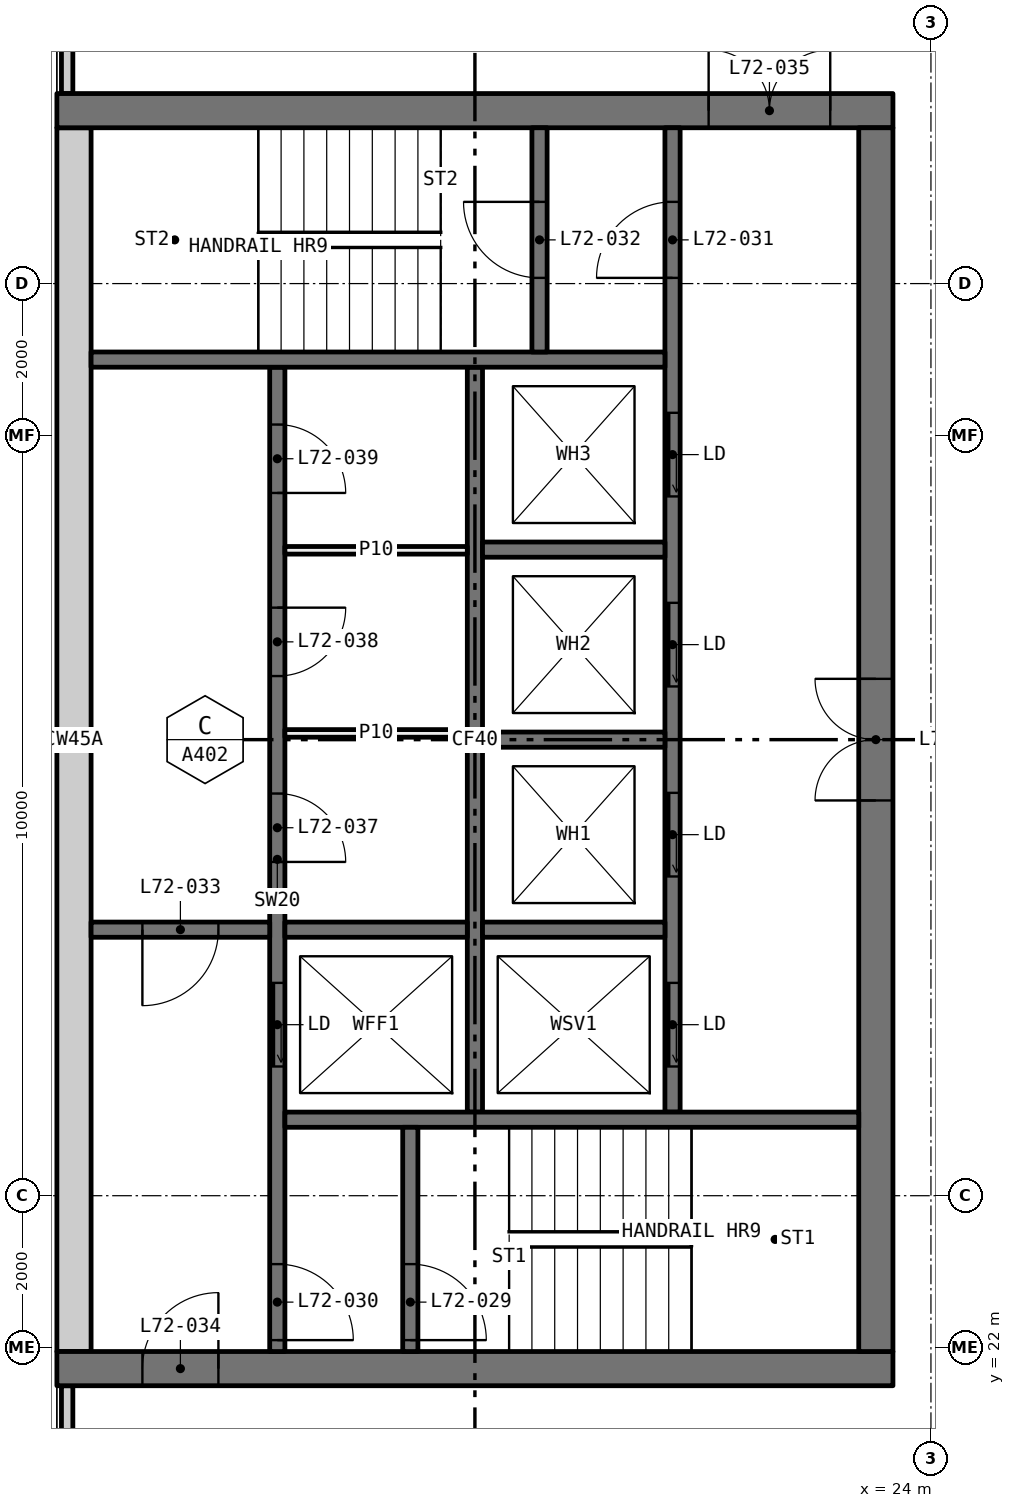
"""IFC4 building model, lengths in metres.
Left out: names, types, materials, properties, quantities, classifications, styles, units other than length and angle.
Written with IfcOpenShell. Run it as: python <this file> out.ifc"""

import sys

from ifc_helpers import new_model, si_unit, direction, frame, frame_2d, origin, place, context, subcontext, project, spatial, rectangle, extrude, element, fill, save


model = new_model("IFC4")
c1 = context("Model", 3, precision=1e-05, world=origin(), true_north=direction((0.0, 1.0)))
c2 = subcontext(c1, "Body", "Model", "MODEL_VIEW")
j1 = project(units=[si_unit("LENGTHUNIT", "METRE"), si_unit("PLANEANGLEUNIT", "RADIAN")], contexts=[c1])
p1 = place(None, origin())
s1 = spatial("IfcSite", under=j1, at=p1, CompositionType="ELEMENT")
p2 = place(p1, origin())
s2 = spatial("IfcBuilding", under=s1, at=p2, CompositionType="ELEMENT")
p3 = place(p2, frame((0.0, 0.0, 266.25)))
s3 = spatial("IfcBuildingStorey", under=s2, at=p3, CompositionType="ELEMENT", Elevation=266.25)
for number, where, z_axis, x_axis in (
    (1, (12.635, 18.71, 0.0), (0.0, 0.0, 1.0), (0.0, 1.0, 0.0)),
    (2, (12.635, 38.5, 0.0), (0.0, 0.0, 1.0), (0.0, 1.0, 0.0)),
):
    element("IfcWall", number, at=place(p3, frame(where, z_axis=z_axis, x_axis=x_axis)), inside=s3, PredefinedType="ELEMENTEDWALL", context=c2, shape_type="SweptSolid", body=[
        extrude(rectangle(XDim=2.79, YDim=0.15, at=frame_2d((1.395, 0.0))), origin(), (0.0, 0.0, 1.0), 3.05),
    ])
p4 = place(p3, frame((12.5, 21.725, 0.0), z_axis=(0.0, 0.0, 1.0), x_axis=(1.0, 0.0, 0.0)))
e3 = element("IfcWall", 3, at=p4, inside=s3, PredefinedType="SHEAR", context=c2, shape_type="SweptSolid", body=[
    extrude(rectangle(XDim=11.0, YDim=0.45, at=frame_2d((5.5, 0.0))), origin(), (0.0, 0.0, 1.0), 3.05),
])
p5 = place(p4, frame((1.125, 0.0, 0.0)))
e4 = element("IfcOpeningElement", 4, at=p5, cuts=e3, PredefinedType="OPENING", context=c2, shape_type="SweptSolid", body=[
    extrude(rectangle(XDim=1.0, YDim=2.1, at=frame_2d((0.5, 1.05))), frame((0.0, 0.235, 0.0), z_axis=(0.0, -1.0, 0.0), x_axis=(1.0, 0.0, 0.0)), (0.0, 0.0, 1.0), 0.47),
])
p6 = place(p3, frame((12.5, 38.275, 0.0), z_axis=(0.0, 0.0, 1.0), x_axis=(1.0, 0.0, 0.0)))
e5 = element("IfcWall", 5, at=p6, inside=s3, PredefinedType="SHEAR", context=c2, shape_type="SweptSolid", body=[
    extrude(rectangle(XDim=11.0, YDim=0.45, at=frame_2d((5.5, 0.0))), origin(), (0.0, 0.0, 1.0), 3.05),
])
p7 = place(p6, frame((8.575, 0.0, 0.0)))
e6 = element("IfcOpeningElement", 6, at=p7, cuts=e5, PredefinedType="OPENING", context=c2, shape_type="SweptSolid", body=[
    extrude(rectangle(XDim=1.6, YDim=2.1, at=frame_2d((0.8, 1.05))), frame((0.0, 0.235, 0.0), z_axis=(0.0, -1.0, 0.0), x_axis=(1.0, 0.0, 0.0)), (0.0, 0.0, 1.0), 0.47),
])
p8 = place(p3, frame((12.725, 21.95, 0.0), z_axis=(0.0, 0.0, 1.0), x_axis=(0.0, 1.0, 0.0)))
e7 = element("IfcWall", 7, at=p8, inside=s3, PredefinedType="SHEAR", context=c2, shape_type="SweptSolid", body=[
    extrude(rectangle(XDim=16.1, YDim=0.45, at=frame_2d((8.05, 0.0))), origin(), (0.0, 0.0, 1.0), 3.05),
])
p9 = place(p3, frame((23.275, 21.95, 0.0), z_axis=(0.0, 0.0, 1.0), x_axis=(0.0, 1.0, 0.0)))
e8 = element("IfcWall", 8, at=p9, inside=s3, PredefinedType="SHEAR", context=c2, shape_type="SweptSolid", body=[
    extrude(rectangle(XDim=16.1, YDim=0.45, at=frame_2d((8.05, 0.0))), origin(), (0.0, 0.0, 1.0), 3.05),
])
p10 = place(p9, frame((7.25, 0.0, 0.0)))
e9 = element("IfcOpeningElement", 9, at=p10, cuts=e8, PredefinedType="OPENING", context=c2, shape_type="SweptSolid", body=[
    extrude(rectangle(XDim=1.6, YDim=2.1, at=frame_2d((0.8, 1.05))), frame((0.0, 0.235, 0.0), z_axis=(0.0, -1.0, 0.0), x_axis=(1.0, 0.0, 0.0)), (0.0, 0.0, 1.0), 0.47),
])
p11 = place(p3, frame((15.4, 21.95, 0.0), z_axis=(0.0, 0.0, 1.0), x_axis=(0.0, 1.0, 0.0)))
e10 = element("IfcWall", 10, at=p11, inside=s3, PredefinedType="SOLIDWALL", context=c2, shape_type="SweptSolid", body=[
    extrude(rectangle(XDim=12.95, YDim=0.2, at=frame_2d((6.475, 0.0))), origin(), (0.0, 0.0, 1.0), 3.05),
])
p12 = place(p11, frame((3.75, 0.0, 0.0)))
e11 = element("IfcOpeningElement", 11, at=p12, cuts=e10, PredefinedType="OPENING", context=c2, shape_type="SweptSolid", body=[
    extrude(rectangle(XDim=1.1, YDim=2.1, at=frame_2d((0.55, 1.05))), frame((0.0, 0.11, 0.0), z_axis=(0.0, -1.0, 0.0), x_axis=(1.0, 0.0, 0.0)), (0.0, 0.0, 1.0), 0.22),
])
p13 = place(p11, frame((0.15, 0.0, 0.0)))
e12 = element("IfcOpeningElement", 12, at=p13, cuts=e10, PredefinedType="OPENING", context=c2, shape_type="SweptSolid", body=[
    extrude(rectangle(XDim=1.0, YDim=2.1, at=frame_2d((0.5, 1.05))), frame((0.0, 0.11, 0.0), z_axis=(0.0, -1.0, 0.0), x_axis=(1.0, 0.0, 0.0)), (0.0, 0.0, 1.0), 0.22),
])
p14 = place(p11, frame((6.441, 0.0, 0.0)))
e13 = element("IfcOpeningElement", 13, at=p14, cuts=e10, PredefinedType="OPENING", context=c2, shape_type="SweptSolid", body=[
    extrude(rectangle(XDim=0.9, YDim=2.1, at=frame_2d((0.45, 1.05))), frame((0.0, 0.11, 0.0), z_axis=(0.0, -1.0, 0.0), x_axis=(1.0, 0.0, 0.0)), (0.0, 0.0, 1.0), 0.22),
])
p15 = place(p11, frame((8.886, 0.0, 0.0)))
e14 = element("IfcOpeningElement", 14, at=p15, cuts=e10, PredefinedType="OPENING", context=c2, shape_type="SweptSolid", body=[
    extrude(rectangle(XDim=0.9, YDim=2.1, at=frame_2d((0.45, 1.05))), frame((0.0, 0.11, 0.0), z_axis=(0.0, -1.0, 0.0), x_axis=(1.0, 0.0, 0.0)), (0.0, 0.0, 1.0), 0.22),
])
p16 = place(p11, frame((11.295, 0.0, 0.0)))
e15 = element("IfcOpeningElement", 15, at=p16, cuts=e10, PredefinedType="OPENING", context=c2, shape_type="SweptSolid", body=[
    extrude(rectangle(XDim=0.9, YDim=2.1, at=frame_2d((0.45, 1.05))), frame((0.0, 0.11, 0.0), z_axis=(0.0, -1.0, 0.0), x_axis=(1.0, 0.0, 0.0)), (0.0, 0.0, 1.0), 0.22),
])
p17 = place(p3, frame((20.6, 25.1, 0.0), z_axis=(0.0, 0.0, 1.0), x_axis=(0.0, 1.0, 0.0)))
e16 = element("IfcWall", 16, at=p17, inside=s3, PredefinedType="SOLIDWALL", context=c2, shape_type="SweptSolid", body=[
    extrude(rectangle(XDim=12.95, YDim=0.2, at=frame_2d((6.475, 0.0))), origin(), (0.0, 0.0, 1.0), 3.05),
])
p18 = place(p17, frame((0.6, 0.0, 0.0)))
e17 = element("IfcOpeningElement", 17, at=p18, cuts=e16, PredefinedType="OPENING", context=c2, shape_type="SweptSolid", body=[
    extrude(rectangle(XDim=1.1, YDim=2.1, at=frame_2d((0.55, 1.05))), frame((0.0, 0.11, 0.0), z_axis=(0.0, -1.0, 0.0), x_axis=(1.0, 0.0, 0.0)), (0.0, 0.0, 1.0), 0.22),
])
p19 = place(p17, frame((3.1, 0.0, 0.0)))
e18 = element("IfcOpeningElement", 18, at=p19, cuts=e16, PredefinedType="OPENING", context=c2, shape_type="SweptSolid", body=[
    extrude(rectangle(XDim=1.1, YDim=2.1, at=frame_2d((0.55, 1.05))), frame((0.0, 0.11, 0.0), z_axis=(0.0, -1.0, 0.0), x_axis=(1.0, 0.0, 0.0)), (0.0, 0.0, 1.0), 0.22),
])
p20 = place(p17, frame((5.6, 0.0, 0.0)))
e19 = element("IfcOpeningElement", 19, at=p20, cuts=e16, PredefinedType="OPENING", context=c2, shape_type="SweptSolid", body=[
    extrude(rectangle(XDim=1.1, YDim=2.1, at=frame_2d((0.55, 1.05))), frame((0.0, 0.11, 0.0), z_axis=(0.0, -1.0, 0.0), x_axis=(1.0, 0.0, 0.0)), (0.0, 0.0, 1.0), 0.22),
])
p21 = place(p17, frame((8.1, 0.0, 0.0)))
e20 = element("IfcOpeningElement", 20, at=p21, cuts=e16, PredefinedType="OPENING", context=c2, shape_type="SweptSolid", body=[
    extrude(rectangle(XDim=1.1, YDim=2.1, at=frame_2d((0.55, 1.05))), frame((0.0, 0.11, 0.0), z_axis=(0.0, -1.0, 0.0), x_axis=(1.0, 0.0, 0.0)), (0.0, 0.0, 1.0), 0.22),
])
p22 = place(p17, frame((10.975, 0.0, 0.0)))
e21 = element("IfcOpeningElement", 21, at=p22, cuts=e16, PredefinedType="OPENING", context=c2, shape_type="SweptSolid", body=[
    extrude(rectangle(XDim=1.0, YDim=2.1, at=frame_2d((0.5, 1.05))), frame((0.0, 0.11, 0.0), z_axis=(0.0, -1.0, 0.0), x_axis=(1.0, 0.0, 0.0)), (0.0, 0.0, 1.0), 0.22),
])
p23 = place(p3, frame((18.0, 25.1, 0.0), z_axis=(0.0, 0.0, 1.0), x_axis=(0.0, 1.0, 0.0)))
e22 = element("IfcWall", 22, at=p23, inside=s3, PredefinedType="SOLIDWALL", context=c2, shape_type="SweptSolid", body=[
    extrude(rectangle(XDim=9.8, YDim=0.2, at=frame_2d((4.9, 0.0))), origin(), (0.0, 0.0, 1.0), 3.05),
])
for number, where, z_axis, x_axis in (
    (23, (15.5, 25.0, 0.0), (0.0, 0.0, 1.0), (1.0, 0.0, 0.0)),
    (24, (12.95, 35.0, 0.0), (0.0, 0.0, 1.0), (1.0, 0.0, 0.0)),
):
    element("IfcWall", number, at=place(p3, frame(where, z_axis=z_axis, x_axis=x_axis)), inside=s3, PredefinedType="SOLIDWALL", context=c2, shape_type="SweptSolid", body=[
        extrude(rectangle(XDim=7.55, YDim=0.2, at=frame_2d((3.775, 0.0))), origin(), (0.0, 0.0, 1.0), 3.05),
    ])
p24 = place(p3, frame((12.95, 27.5, 0.0), z_axis=(0.0, 0.0, 1.0), x_axis=(1.0, 0.0, 0.0)))
e25 = element("IfcWall", 25, at=p24, inside=s3, PredefinedType="SOLIDWALL", context=c2, shape_type="SweptSolid", body=[
    extrude(rectangle(XDim=2.35, YDim=0.2, at=frame_2d((1.175, 0.0))), origin(), (0.0, 0.0, 1.0), 3.05),
])
p25 = place(p24, frame((0.675, 0.0, 0.0)))
e26 = element("IfcOpeningElement", 26, at=p25, cuts=e25, PredefinedType="OPENING", context=c2, shape_type="SweptSolid", body=[
    extrude(rectangle(XDim=1.0, YDim=2.1, at=frame_2d((0.5, 1.05))), frame((0.0, 0.11, 0.0), z_axis=(0.0, -1.0, 0.0), x_axis=(1.0, 0.0, 0.0)), (0.0, 0.0, 1.0), 0.22),
])
p26 = place(p3, frame((17.15, 21.95, 0.0), z_axis=(0.0, 0.0, 1.0), x_axis=(0.0, 1.0, 0.0)))
e27 = element("IfcWall", 27, at=p26, inside=s3, PredefinedType="SOLIDWALL", context=c2, shape_type="SweptSolid", body=[
    extrude(rectangle(XDim=2.95, YDim=0.2, at=frame_2d((1.475, 0.0))), origin(), (0.0, 0.0, 1.0), 3.05),
])
p27 = place(p26, frame((0.15, 0.0, 0.0)))
e28 = element("IfcOpeningElement", 28, at=p27, cuts=e27, PredefinedType="OPENING", context=c2, shape_type="SweptSolid", body=[
    extrude(rectangle(XDim=1.0, YDim=2.1, at=frame_2d((0.5, 1.05))), frame((0.0, 0.11, 0.0), z_axis=(0.0, -1.0, 0.0), x_axis=(1.0, 0.0, 0.0)), (0.0, 0.0, 1.0), 0.22),
])
p28 = place(p3, frame((18.85, 35.1, 0.0), z_axis=(0.0, 0.0, 1.0), x_axis=(0.0, 1.0, 0.0)))
e29 = element("IfcWall", 29, at=p28, inside=s3, PredefinedType="SOLIDWALL", context=c2, shape_type="SweptSolid", body=[
    extrude(rectangle(XDim=2.95, YDim=0.2, at=frame_2d((1.475, 0.0))), origin(), (0.0, 0.0, 1.0), 3.05),
])
p29 = place(p28, frame((0.975, 0.0, 0.0)))
e30 = element("IfcOpeningElement", 30, at=p29, cuts=e29, PredefinedType="OPENING", context=c2, shape_type="SweptSolid", body=[
    extrude(rectangle(XDim=1.0, YDim=2.1, at=frame_2d((0.5, 1.05))), frame((0.0, 0.11, 0.0), z_axis=(0.0, -1.0, 0.0), x_axis=(1.0, 0.0, 0.0)), (0.0, 0.0, 1.0), 0.22),
])
for number, where, z_axis, x_axis in (
    (31, (15.5, 27.5, 0.0), (0.0, 0.0, 1.0), (1.0, 0.0, 0.0)),
    (32, (18.1, 27.5, 0.0), (0.0, 0.0, 1.0), (1.0, 0.0, 0.0)),
    (33, (18.1, 30.0, 0.0), (0.0, 0.0, 1.0), (1.0, 0.0, 0.0)),
    (34, (18.1, 32.5, 0.0), (0.0, 0.0, 1.0), (1.0, 0.0, 0.0)),
):
    element("IfcWall", number, at=place(p3, frame(where, z_axis=z_axis, x_axis=x_axis)), inside=s3, PredefinedType="SOLIDWALL", context=c2, shape_type="SweptSolid", body=[
        extrude(rectangle(XDim=2.4, YDim=0.2, at=frame_2d((1.2, 0.0))), origin(), (0.0, 0.0, 1.0), 3.05),
    ])
for number, where, z_axis, x_axis in (
    (35, (15.5, 30.082, 0.0), (0.0, 0.0, 1.0), (1.0, 0.0, 0.0)),
    (36, (15.5, 32.491, 0.0), (0.0, 0.0, 1.0), (1.0, 0.0, 0.0)),
):
    element("IfcWall", number, at=place(p3, frame(where, z_axis=z_axis, x_axis=x_axis)), inside=s3, PredefinedType="PARTITIONING", context=c2, shape_type="SweptSolid", body=[
        extrude(rectangle(XDim=2.4, YDim=0.1, at=frame_2d((1.2, 0.0))), origin(), (0.0, 0.0, 1.0), 3.05),
    ])
p30 = place(p18, origin())
e37 = element("IfcDoor", 37, at=p30, inside=s3, OperationType="SLIDING_TO_LEFT", PredefinedType="DOOR", context=c2, shape_type="SweptSolid", body=[
    extrude(rectangle(XDim=1.1, YDim=2.1, at=frame_2d((0.55, 1.05))), frame((0.0, 0.025, 0.0), z_axis=(0.0, -1.0, 0.0), x_axis=(1.0, 0.0, 0.0)), (0.0, 0.0, 1.0), 0.05),
])
fill(e17, e37)
p31 = place(p19, origin())
e38 = element("IfcDoor", 38, at=p31, inside=s3, OperationType="SLIDING_TO_LEFT", PredefinedType="DOOR", context=c2, shape_type="SweptSolid", body=[
    extrude(rectangle(XDim=1.1, YDim=2.1, at=frame_2d((0.55, 1.05))), frame((0.0, 0.025, 0.0), z_axis=(0.0, -1.0, 0.0), x_axis=(1.0, 0.0, 0.0)), (0.0, 0.0, 1.0), 0.05),
])
fill(e18, e38)
p32 = place(p20, origin())
e39 = element("IfcDoor", 39, at=p32, inside=s3, OperationType="SLIDING_TO_LEFT", PredefinedType="DOOR", context=c2, shape_type="SweptSolid", body=[
    extrude(rectangle(XDim=1.1, YDim=2.1, at=frame_2d((0.55, 1.05))), frame((0.0, 0.025, 0.0), z_axis=(0.0, -1.0, 0.0), x_axis=(1.0, 0.0, 0.0)), (0.0, 0.0, 1.0), 0.05),
])
fill(e19, e39)
p33 = place(p21, origin())
e40 = element("IfcDoor", 40, at=p33, inside=s3, OperationType="SLIDING_TO_LEFT", PredefinedType="DOOR", context=c2, shape_type="SweptSolid", body=[
    extrude(rectangle(XDim=1.1, YDim=2.1, at=frame_2d((0.55, 1.05))), frame((0.0, 0.025, 0.0), z_axis=(0.0, -1.0, 0.0), x_axis=(1.0, 0.0, 0.0)), (0.0, 0.0, 1.0), 0.05),
])
fill(e20, e40)
p34 = place(p12, origin())
e41 = element("IfcDoor", 41, at=p34, inside=s3, OperationType="SLIDING_TO_LEFT", PredefinedType="DOOR", context=c2, shape_type="SweptSolid", body=[
    extrude(rectangle(XDim=1.1, YDim=2.1, at=frame_2d((0.55, 1.05))), frame((0.0, 0.025, 0.0), z_axis=(0.0, -1.0, 0.0), x_axis=(1.0, 0.0, 0.0)), (0.0, 0.0, 1.0), 0.05),
])
fill(e11, e41)
p35 = place(p27, frame((1.0, 0.0, 0.0), x_axis=(-1.0, 0.0, 0.0)))
e42 = element("IfcDoor", 42, at=p35, inside=s3, OperationType="SINGLE_SWING_LEFT", PredefinedType="DOOR", context=c2, shape_type="SweptSolid", body=[
    extrude(rectangle(XDim=1.0, YDim=2.1, at=frame_2d((0.5, 1.05))), frame((0.0, 0.025, 0.0), z_axis=(0.0, -1.0, 0.0), x_axis=(1.0, 0.0, 0.0)), (0.0, 0.0, 1.0), 0.05),
])
fill(e28, e42)
p36 = place(p13, frame((1.0, 0.0, 0.0), x_axis=(-1.0, 0.0, 0.0)))
e43 = element("IfcDoor", 43, at=p36, inside=s3, OperationType="SINGLE_SWING_LEFT", PredefinedType="DOOR", context=c2, shape_type="SweptSolid", body=[
    extrude(rectangle(XDim=1.0, YDim=2.1, at=frame_2d((0.5, 1.05))), frame((0.0, 0.025, 0.0), z_axis=(0.0, -1.0, 0.0), x_axis=(1.0, 0.0, 0.0)), (0.0, 0.0, 1.0), 0.05),
])
fill(e12, e43)
p37 = place(p22, origin())
e44 = element("IfcDoor", 44, at=p37, inside=s3, OperationType="SINGLE_SWING_RIGHT", PredefinedType="DOOR", context=c2, shape_type="SweptSolid", body=[
    extrude(rectangle(XDim=1.0, YDim=2.1, at=frame_2d((0.5, 1.05))), frame((0.0, 0.025, 0.0), z_axis=(0.0, -1.0, 0.0), x_axis=(1.0, 0.0, 0.0)), (0.0, 0.0, 1.0), 0.05),
])
fill(e21, e44)
p38 = place(p29, origin())
e45 = element("IfcDoor", 45, at=p38, inside=s3, OperationType="SINGLE_SWING_LEFT", PredefinedType="DOOR", context=c2, shape_type="SweptSolid", body=[
    extrude(rectangle(XDim=1.0, YDim=2.1, at=frame_2d((0.5, 1.05))), frame((0.0, 0.025, 0.0), z_axis=(0.0, -1.0, 0.0), x_axis=(1.0, 0.0, 0.0)), (0.0, 0.0, 1.0), 0.05),
])
fill(e30, e45)
p39 = place(p25, frame((1.0, 0.0, 0.0), x_axis=(-1.0, 0.0, 0.0)))
e46 = element("IfcDoor", 46, at=p39, inside=s3, OperationType="SINGLE_SWING_LEFT", PredefinedType="DOOR", context=c2, shape_type="SweptSolid", body=[
    extrude(rectangle(XDim=1.0, YDim=2.1, at=frame_2d((0.5, 1.05))), frame((0.0, 0.025, 0.0), z_axis=(0.0, -1.0, 0.0), x_axis=(1.0, 0.0, 0.0)), (0.0, 0.0, 1.0), 0.05),
])
fill(e26, e46)
p40 = place(p5, origin())
e47 = element("IfcDoor", 47, at=p40, inside=s3, OperationType="SINGLE_SWING_LEFT", PredefinedType="DOOR", context=c2, shape_type="SweptSolid", body=[
    extrude(rectangle(XDim=1.0, YDim=2.1, at=frame_2d((0.5, 1.05))), frame((0.0, 0.025, 0.0), z_axis=(0.0, -1.0, 0.0), x_axis=(1.0, 0.0, 0.0)), (0.0, 0.0, 1.0), 0.05),
])
fill(e4, e47)
p41 = place(p7, origin())
e48 = element("IfcDoor", 48, at=p41, inside=s3, OperationType="DOUBLE_DOOR_SINGLE_SWING", PredefinedType="DOOR", context=c2, shape_type="SweptSolid", body=[
    extrude(rectangle(XDim=1.6, YDim=2.1, at=frame_2d((0.8, 1.05))), frame((0.0, 0.025, 0.0), z_axis=(0.0, -1.0, 0.0), x_axis=(1.0, 0.0, 0.0)), (0.0, 0.0, 1.0), 0.05),
])
fill(e6, e48)
p42 = place(p10, origin())
e49 = element("IfcDoor", 49, at=p42, inside=s3, OperationType="DOUBLE_DOOR_SINGLE_SWING", PredefinedType="DOOR", context=c2, shape_type="SweptSolid", body=[
    extrude(rectangle(XDim=1.6, YDim=2.1, at=frame_2d((0.8, 1.05))), frame((0.0, 0.025, 0.0), z_axis=(0.0, -1.0, 0.0), x_axis=(1.0, 0.0, 0.0)), (0.0, 0.0, 1.0), 0.05),
])
fill(e9, e49)
p43 = place(p14, frame((0.9, 0.0, 0.0), x_axis=(-1.0, 0.0, 0.0)))
e50 = element("IfcDoor", 50, at=p43, inside=s3, OperationType="SINGLE_SWING_LEFT", PredefinedType="DOOR", context=c2, shape_type="SweptSolid", body=[
    extrude(rectangle(XDim=0.9, YDim=2.1, at=frame_2d((0.45, 1.05))), frame((0.0, 0.025, 0.0), z_axis=(0.0, -1.0, 0.0), x_axis=(1.0, 0.0, 0.0)), (0.0, 0.0, 1.0), 0.05),
])
fill(e13, e50)
p44 = place(p15, frame((0.9, 0.0, 0.0), x_axis=(-1.0, 0.0, 0.0)))
e51 = element("IfcDoor", 51, at=p44, inside=s3, OperationType="SINGLE_SWING_RIGHT", PredefinedType="DOOR", context=c2, shape_type="SweptSolid", body=[
    extrude(rectangle(XDim=0.9, YDim=2.1, at=frame_2d((0.45, 1.05))), frame((0.0, 0.025, 0.0), z_axis=(0.0, -1.0, 0.0), x_axis=(1.0, 0.0, 0.0)), (0.0, 0.0, 1.0), 0.05),
])
fill(e14, e51)
p45 = place(p16, frame((0.9, 0.0, 0.0), x_axis=(-1.0, 0.0, 0.0)))
e52 = element("IfcDoor", 52, at=p45, inside=s3, OperationType="SINGLE_SWING_LEFT", PredefinedType="DOOR", context=c2, shape_type="SweptSolid", body=[
    extrude(rectangle(XDim=0.9, YDim=2.1, at=frame_2d((0.45, 1.05))), frame((0.0, 0.025, 0.0), z_axis=(0.0, -1.0, 0.0), x_axis=(1.0, 0.0, 0.0)), (0.0, 0.0, 1.0), 0.05),
])
fill(e15, e52)
save(model, sys.argv[1])
